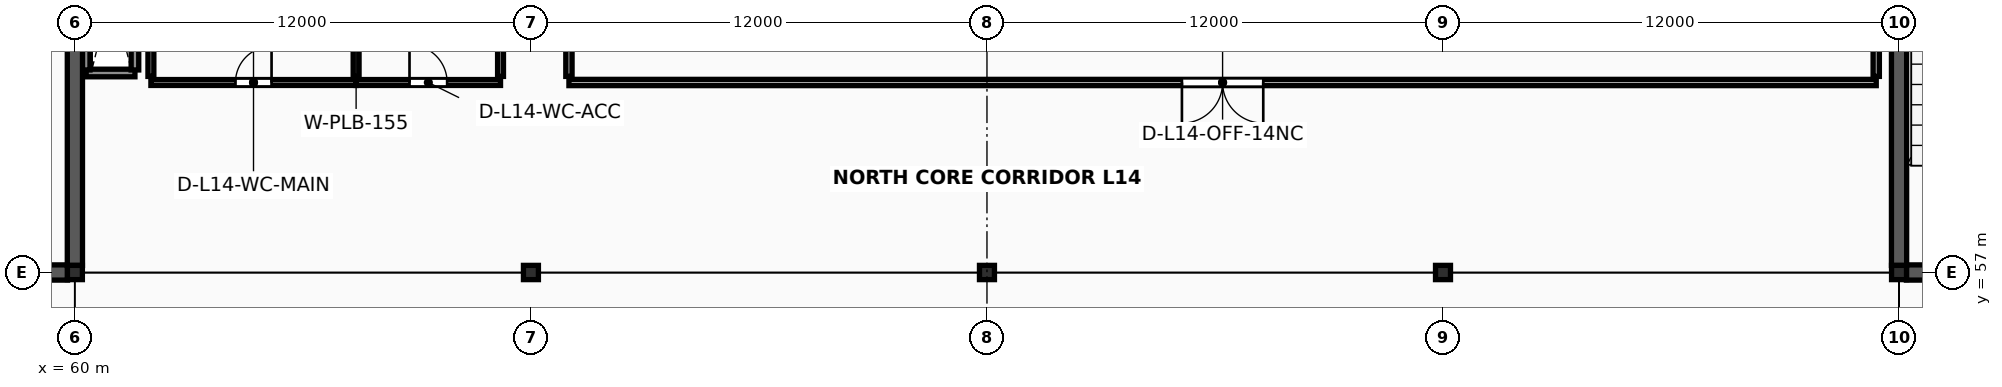
"""IFC4 building model, lengths in metres.
Left out: names, types, materials, properties, quantities, classifications, styles, units other than length and angle.
Written with IfcOpenShell. Run it as: python <this file> out.ifc"""

import sys

from ifc_helpers import new_model, si_unit, direction, frame, frame_2d, origin, origin_2d, place, context, subcontext, project, spatial, rectangle, i_section, extrude, element, fill, save


model = new_model("IFC4")
c1 = context("Model", 3, precision=1e-05, world=origin(), true_north=direction((0.0, 1.0)))
c2 = subcontext(c1, "Body", "Model", "MODEL_VIEW")
j1 = project(units=[si_unit("LENGTHUNIT", "METRE"), si_unit("PLANEANGLEUNIT", "RADIAN")], contexts=[c1])
p1 = place(None, origin())
s1 = spatial("IfcSite", under=j1, at=p1, CompositionType="ELEMENT")
p2 = place(p1, origin())
s2 = spatial("IfcBuilding", under=s1, at=p2, CompositionType="ELEMENT")
p3 = place(p2, frame((0.0, 0.0, 57.6)))
s3 = spatial("IfcBuildingStorey", under=s2, at=p3, CompositionType="ELEMENT", Elevation=57.6)
for number, where, z_axis, x_axis in (
    (1, (60.0, 57.0, 0.0), (0.0, 0.0, 1.0), (1.0, 0.0, 0.0)),
    (2, (72.0, 57.0, 0.0), (0.0, 0.0, 1.0), (1.0, 0.0, 0.0)),
    (3, (84.0, 57.0, 0.0), (0.0, 0.0, 1.0), (1.0, 0.0, 0.0)),
    (4, (96.0, 57.0, 0.0), (0.0, 0.0, 1.0), (1.0, 0.0, 0.0)),
    (5, (108.0, 57.0, 0.0), (0.0, 0.0, 1.0), (1.0, 0.0, 0.0)),
):
    element("IfcColumn", number, at=place(p3, frame(where, z_axis=z_axis, x_axis=x_axis)), inside=s3, PredefinedType="COLUMN", context=c2, shape_type="SweptSolid", body=[
        extrude(i_section(OverallWidth=0.394, OverallDepth=0.375, WebThickness=0.017, FlangeThickness=0.028, FilletRadius=0.018, at=origin_2d()), origin(), (0.0, 0.0, 1.0), 4.0),
    ])
p4 = place(p3, frame((60.297, 62.25, 0.0), z_axis=(0.0, 0.0, 1.0), x_axis=(1.0, 0.0, 0.0)))
e6 = element("IfcWall", 6, at=p4, inside=s3, PredefinedType="SOLIDWALL", context=c2, shape_type="SweptSolid", body=[
    extrude(rectangle(XDim=1.283, YDim=0.2, at=frame_2d((0.642, 0.0))), origin(), (0.0, 0.0, 1.0), 3.853),
])
for number, where, z_axis, x_axis in (
    (7, (60.297, 62.33, 0.0), (0.0, 0.0, 1.0), (0.0, 1.0, 0.0)),
    (8, (61.58, 62.33, 0.0), (0.0, 0.0, 1.0), (0.0, 1.0, 0.0)),
):
    element("IfcWall", number, at=place(p3, frame(where, z_axis=z_axis, x_axis=x_axis)), inside=s3, PredefinedType="SOLIDWALL", context=c2, shape_type="SweptSolid", body=[
        extrude(rectangle(XDim=4.14, YDim=0.2, at=frame_2d((2.07, 0.0))), origin(), (0.0, 0.0, 1.0), 3.853),
    ])
p5 = place(p3, frame((48.194, 57.0, 0.0), z_axis=(0.0, 0.0, 1.0), x_axis=(1.0, 0.0, 0.0)))
e9 = element("IfcWall", 9, at=p5, inside=s3, PredefinedType="SHEAR", context=c2, shape_type="SweptSolid", body=[
    extrude(rectangle(XDim=11.612, YDim=0.4, at=frame_2d((5.806, 0.0))), origin(), (0.0, 0.0, 1.0), 3.853),
])
p6 = place(p5, frame((5.006, 0.0, 0.0)))
e10 = element("IfcOpeningElement", 10, at=p6, cuts=e9, PredefinedType="OPENING", context=c2, shape_type="SweptSolid", body=[
    extrude(rectangle(XDim=1.2, YDim=2.2, at=frame_2d((0.6, 1.1))), frame((0.0, 0.215, 0.0), z_axis=(0.0, -1.0, 0.0), x_axis=(1.0, 0.0, 0.0)), (0.0, 0.0, 1.0), 0.43),
])
p7 = place(p5, frame((8.706, 0.0, 0.0)))
e11 = element("IfcOpeningElement", 11, at=p7, cuts=e9, PredefinedType="OPENING", context=c2, shape_type="SweptSolid", body=[
    extrude(rectangle(XDim=1.5, YDim=2.25, at=frame_2d((0.75, 1.125))), frame((0.0, 0.215, 0.0), z_axis=(0.0, -1.0, 0.0), x_axis=(1.0, 0.0, 0.0)), (0.0, 0.0, 1.0), 0.43),
])
p8 = place(p3, frame((60.0, 57.185, 0.0), z_axis=(0.0, 0.0, 1.0), x_axis=(0.0, 1.0, 0.0)))
e12 = element("IfcWall", 12, at=p8, inside=s3, PredefinedType="SHEAR", context=c2, shape_type="SweptSolid", body=[
    extrude(rectangle(XDim=11.64, YDim=0.4, at=frame_2d((5.82, 0.0))), origin(), (0.0, 0.0, 1.0), 3.853),
])
p9 = place(p3, frame((108.194, 57.0, 0.0), z_axis=(0.0, 0.0, 1.0), x_axis=(1.0, 0.0, 0.0)))
e13 = element("IfcWall", 13, at=p9, inside=s3, PredefinedType="SHEAR", context=c2, shape_type="SweptSolid", body=[
    extrude(rectangle(XDim=11.612, YDim=0.4, at=frame_2d((5.806, 0.0))), origin(), (0.0, 0.0, 1.0), 3.853),
])
p10 = place(p9, frame((5.006, 0.0, 0.0)))
e14 = element("IfcOpeningElement", 14, at=p10, cuts=e13, PredefinedType="OPENING", context=c2, shape_type="SweptSolid", body=[
    extrude(rectangle(XDim=1.2, YDim=2.2, at=frame_2d((0.6, 1.1))), frame((0.0, 0.215, 0.0), z_axis=(0.0, -1.0, 0.0), x_axis=(1.0, 0.0, 0.0)), (0.0, 0.0, 1.0), 0.43),
])
p11 = place(p9, frame((8.706, 0.0, 0.0)))
e15 = element("IfcOpeningElement", 15, at=p11, cuts=e13, PredefinedType="OPENING", context=c2, shape_type="SweptSolid", body=[
    extrude(rectangle(XDim=1.5, YDim=2.25, at=frame_2d((0.75, 1.125))), frame((0.0, 0.215, 0.0), z_axis=(0.0, -1.0, 0.0), x_axis=(1.0, 0.0, 0.0)), (0.0, 0.0, 1.0), 0.43),
])
p12 = place(p3, frame((108.0, 57.185, 0.0), z_axis=(0.0, 0.0, 1.0), x_axis=(0.0, 1.0, 0.0)))
e16 = element("IfcWall", 16, at=p12, inside=s3, PredefinedType="SHEAR", context=c2, shape_type="SweptSolid", body=[
    extrude(rectangle(XDim=11.64, YDim=0.4, at=frame_2d((5.82, 0.0))), origin(), (0.0, 0.0, 1.0), 3.853),
])
p13 = place(p3, frame((62.0, 62.0, 0.0), z_axis=(0.0, 0.0, 1.0), x_axis=(1.0, 0.0, 0.0)))
e17 = element("IfcWall", 17, at=p13, inside=s3, PredefinedType="PLUMBINGWALL", context=c2, shape_type="SweptSolid", body=[
    extrude(rectangle(XDim=5.4, YDim=0.155, at=frame_2d((2.7, 0.0))), origin(), (0.0, 0.0, 1.0), 2.88),
])
p14 = place(p13, frame((2.225, 0.0, 0.0)))
e18 = element("IfcOpeningElement", 18, at=p14, cuts=e17, PredefinedType="OPENING", context=c2, shape_type="SweptSolid", body=[
    extrude(rectangle(XDim=0.95, YDim=2.13, at=frame_2d((0.475, 1.065))), frame((0.0, 0.093, 0.0), z_axis=(0.0, -1.0, 0.0), x_axis=(1.0, 0.0, 0.0)), (0.0, 0.0, 1.0), 0.185),
])
for number, where, z_axis, x_axis in (
    (19, (62.0, 62.16, 0.0), (0.0, 0.0, 1.0), (0.0, 1.0, 0.0)),
    (20, (67.4, 62.16, 0.0), (0.0, 0.0, 1.0), (0.0, 1.0, 0.0)),
):
    element("IfcWall", number, at=place(p3, frame(where, z_axis=z_axis, x_axis=x_axis)), inside=s3, PredefinedType="PLUMBINGWALL", context=c2, shape_type="SweptSolid", body=[
        extrude(rectangle(XDim=4.48, YDim=0.155, at=frame_2d((2.24, 0.0))), origin(), (0.0, 0.0, 1.0), 2.88),
    ])
p15 = place(p3, frame((67.4, 62.0, 0.0), z_axis=(0.0, 0.0, 1.0), x_axis=(1.0, 0.0, 0.0)))
e21 = element("IfcWall", 21, at=p15, inside=s3, PredefinedType="PLUMBINGWALL", context=c2, shape_type="SweptSolid", body=[
    extrude(rectangle(XDim=3.8, YDim=0.155, at=frame_2d((1.9, 0.0))), origin(), (0.0, 0.0, 1.0), 2.88),
])
p16 = place(p15, frame((1.405, 0.0, 0.0)))
e22 = element("IfcOpeningElement", 22, at=p16, cuts=e21, PredefinedType="OPENING", context=c2, shape_type="SweptSolid", body=[
    extrude(rectangle(XDim=0.99, YDim=2.15, at=frame_2d((0.495, 1.075))), frame((0.0, 0.093, 0.0), z_axis=(0.0, -1.0, 0.0), x_axis=(1.0, 0.0, 0.0)), (0.0, 0.0, 1.0), 0.185),
])
p17 = place(p3, frame((71.2, 62.16, 0.0), z_axis=(0.0, 0.0, 1.0), x_axis=(0.0, 1.0, 0.0)))
e23 = element("IfcWall", 23, at=p17, inside=s3, PredefinedType="PLUMBINGWALL", context=c2, shape_type="SweptSolid", body=[
    extrude(rectangle(XDim=4.48, YDim=0.155, at=frame_2d((2.24, 0.0))), origin(), (0.0, 0.0, 1.0), 2.88),
])
p18 = place(p3, frame((73.0, 62.0, 0.0), z_axis=(0.0, 0.0, 1.0), x_axis=(1.0, 0.0, 0.0)))
e24 = element("IfcWall", 24, at=p18, inside=s3, PredefinedType="PARTITIONING", context=c2, shape_type="SweptSolid", body=[
    extrude(rectangle(XDim=34.4, YDim=0.165, at=frame_2d((17.2, 0.0))), origin(), (0.0, 0.0, 1.0), 2.88),
])
p19 = place(p18, frame((16.13, 0.0, 0.0)))
e25 = element("IfcOpeningElement", 25, at=p19, cuts=e24, PredefinedType="OPENING", context=c2, shape_type="SweptSolid", body=[
    extrude(rectangle(XDim=2.14, YDim=2.44, at=frame_2d((1.07, 1.22))), frame((0.0, 0.097, 0.0), z_axis=(0.0, -1.0, 0.0), x_axis=(1.0, 0.0, 0.0)), (0.0, 0.0, 1.0), 0.195),
])
for number, where, z_axis, x_axis in (
    (26, (73.0, 62.16, 0.0), (0.0, 0.0, 1.0), (0.0, 1.0, 0.0)),
    (27, (107.4, 62.16, 0.0), (0.0, 0.0, 1.0), (0.0, 1.0, 0.0)),
):
    element("IfcWall", number, at=place(p3, frame(where, z_axis=z_axis, x_axis=x_axis)), inside=s3, PredefinedType="PARTITIONING", context=c2, shape_type="SweptSolid", body=[
        extrude(rectangle(XDim=6.7, YDim=0.165, at=frame_2d((3.35, 0.0))), origin(), (0.0, 0.0, 1.0), 2.88),
    ])
p20 = place(p14, origin())
e28 = element("IfcDoor", 28, at=p20, inside=s3, OperationType="SINGLE_SWING_RIGHT", PredefinedType="DOOR", context=c2, shape_type="SweptSolid", body=[
    extrude(rectangle(XDim=0.95, YDim=2.13, at=frame_2d((0.475, 1.065))), frame((0.0, 0.025, 0.0), z_axis=(0.0, -1.0, 0.0), x_axis=(1.0, 0.0, 0.0)), (0.0, 0.0, 1.0), 0.05),
])
fill(e18, e28)
p21 = place(p16, origin())
e29 = element("IfcDoor", 29, at=p21, inside=s3, OperationType="SINGLE_SWING_LEFT", PredefinedType="DOOR", context=c2, shape_type="SweptSolid", body=[
    extrude(rectangle(XDim=0.99, YDim=2.15, at=frame_2d((0.495, 1.075))), frame((0.0, 0.025, 0.0), z_axis=(0.0, -1.0, 0.0), x_axis=(1.0, 0.0, 0.0)), (0.0, 0.0, 1.0), 0.05),
])
fill(e22, e29)
p22 = place(p19, origin())
e30 = element("IfcDoor", 30, at=p22, inside=s3, OperationType="DOUBLE_DOOR_SINGLE_SWING", PredefinedType="DOOR", context=c2, shape_type="SweptSolid", body=[
    extrude(rectangle(XDim=2.14, YDim=2.44, at=frame_2d((1.07, 1.22))), frame((0.0, 0.025, 0.0), z_axis=(0.0, -1.0, 0.0), x_axis=(1.0, 0.0, 0.0)), (0.0, 0.0, 1.0), 0.05),
])
fill(e25, e30)
save(model, sys.argv[1])
